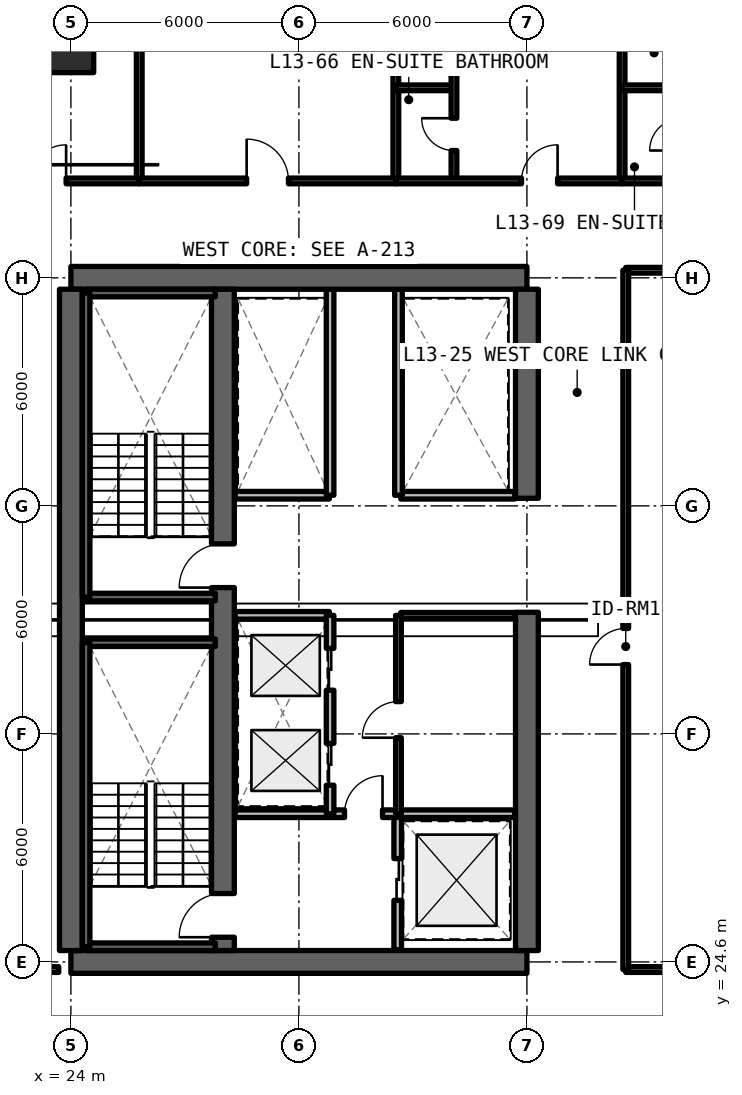
"""IFC4 building model, lengths in metres.
Left out: names, types, materials, properties, quantities, classifications, styles, units other than length and angle.
Written with IfcOpenShell. Run it as: python <this file> out.ifc"""

import sys

from ifc_helpers import new_model, si_unit, direction, frame, frame_2d, origin, origin_2d, place, context, subcontext, project, spatial, rectangle, extrude, element, fill, save


model = new_model("IFC4")
c1 = context("Model", 3, precision=1e-05, world=origin(), true_north=direction((0.0, 1.0)))
c2 = subcontext(c1, "Body", "Model", "MODEL_VIEW")
j1 = project(units=[si_unit("LENGTHUNIT", "METRE"), si_unit("PLANEANGLEUNIT", "RADIAN")], contexts=[c1])
p1 = place(None, origin())
s1 = spatial("IfcSite", under=j1, at=p1, CompositionType="ELEMENT")
p2 = place(p1, origin())
s2 = spatial("IfcBuilding", under=s1, at=p2, CompositionType="ELEMENT")
p3 = place(p2, frame((0.0, 0.0, 48.84)))
s3 = spatial("IfcBuildingStorey", under=s2, at=p3, CompositionType="ELEMENT", Elevation=48.84)
for number, where, z_axis, x_axis in (
    (1, (24.0, 24.6, 0.0), (0.0, 0.0, 1.0), (1.0, 0.0, 0.0)),
    (2, (36.0, 42.6, 0.0), (0.0, 0.0, 1.0), (-1.0, 0.0, 0.0)),
):
    element("IfcWall", number, at=place(p3, frame(where, z_axis=z_axis, x_axis=x_axis)), inside=s3, PredefinedType="SHEAR", context=c2, shape_type="SweptSolid", body=[
        extrude(rectangle(XDim=12.0, YDim=0.6, at=frame_2d((6.0, 0.0))), origin(), (0.0, 0.0, 1.0), 3.3),
    ])
p4 = place(p3, frame((24.0, 24.9, 0.0), z_axis=(0.0, 0.0, 1.0), x_axis=(0.0, 1.0, 0.0)))
e3 = element("IfcWall", 3, at=p4, inside=s3, PredefinedType="SHEAR", context=c2, shape_type="SweptSolid", body=[
    extrude(rectangle(XDim=17.4, YDim=0.6, at=frame_2d((8.7, 0.0))), origin(), (0.0, 0.0, 1.0), 3.3),
])
p5 = place(p3, frame((36.0, 24.9, 0.0), z_axis=(0.0, 0.0, 1.0), x_axis=(0.0, 1.0, 0.0)))
e4 = element("IfcWall", 4, at=p5, inside=s3, PredefinedType="SHEAR", context=c2, shape_type="SweptSolid", body=[
    extrude(rectangle(XDim=8.9, YDim=0.6, at=frame_2d((4.45, 0.0))), origin(), (0.0, 0.0, 1.0), 3.3),
])
p6 = place(p3, frame((36.0, 36.8, 0.0), z_axis=(0.0, 0.0, 1.0), x_axis=(0.0, 1.0, 0.0)))
e5 = element("IfcWall", 5, at=p6, inside=s3, PredefinedType="SHEAR", context=c2, shape_type="SweptSolid", body=[
    extrude(rectangle(XDim=5.5, YDim=0.6, at=frame_2d((2.75, 0.0))), origin(), (0.0, 0.0, 1.0), 3.3),
])
p7 = place(p3, frame((28.0, 24.9, 0.0), z_axis=(0.0, 0.0, 1.0), x_axis=(0.0, 1.0, 0.0)))
e6 = element("IfcWall", 6, at=p7, inside=s3, PredefinedType="SHEAR", context=c2, shape_type="SweptSolid", body=[
    extrude(rectangle(XDim=17.4, YDim=0.6, at=frame_2d((8.7, 0.0))), origin(), (0.0, 0.0, 1.0), 3.3),
])
p8 = place(p7, frame((0.35, 0.0, 0.0)))
e7 = element("IfcOpeningElement", 7, at=p8, cuts=e6, PredefinedType="OPENING", context=c2, shape_type="SweptSolid", body=[
    extrude(rectangle(XDim=1.15, YDim=2.15, at=frame_2d((0.575, 1.075))), frame((0.0, 0.31, 0.0), z_axis=(0.0, -1.0, 0.0), x_axis=(1.0, 0.0, 0.0)), (0.0, 0.0, 1.0), 0.62),
])
p9 = place(p7, frame((9.55, 0.0, 0.0)))
e8 = element("IfcOpeningElement", 8, at=p9, cuts=e6, PredefinedType="OPENING", context=c2, shape_type="SweptSolid", body=[
    extrude(rectangle(XDim=1.15, YDim=2.15, at=frame_2d((0.575, 1.075))), frame((0.0, 0.31, 0.0), z_axis=(0.0, -1.0, 0.0), x_axis=(1.0, 0.0, 0.0)), (0.0, 0.0, 1.0), 0.62),
])
p10 = place(p3, frame((24.0, 48.6, 0.0), z_axis=(0.0, 0.0, 1.0), x_axis=(1.0, 0.0, 0.0)))
e9 = element("IfcColumn", 9, at=p10, inside=s3, PredefinedType="COLUMN", context=c2, shape_type="SweptSolid", body=[
    extrude(rectangle(XDim=1.2, YDim=1.2, at=origin_2d()), origin(), (0.0, 0.0, 1.0), 3.3),
])
p11 = place(p3, frame((32.6, 24.92, 0.0), z_axis=(0.0, 0.0, 1.0), x_axis=(0.0, 1.0, 0.0)))
e10 = element("IfcWall", 10, at=p11, inside=s3, PredefinedType="SOLIDWALL", context=c2, shape_type="SweptSolid", body=[
    extrude(rectangle(XDim=3.58, YDim=0.2, at=frame_2d((1.79, 0.0))), origin(), (0.0, 0.0, 1.0), 2.35),
])
p12 = place(p11, frame((1.3, 0.0, 0.0)))
e11 = element("IfcOpeningElement", 11, at=p12, cuts=e10, PredefinedType="OPENING", context=c2, shape_type="SweptSolid", body=[
    extrude(rectangle(XDim=1.1, YDim=2.2, at=frame_2d((0.55, 1.1))), frame((0.0, 0.11, 0.0), z_axis=(0.0, -1.0, 0.0), x_axis=(1.0, 0.0, 0.0)), (0.0, 0.0, 1.0), 0.22),
])
p13 = place(p3, frame((28.32, 28.5, 0.0), z_axis=(0.0, 0.0, 1.0), x_axis=(1.0, 0.0, 0.0)))
e12 = element("IfcWall", 12, at=p13, inside=s3, PredefinedType="SOLIDWALL", context=c2, shape_type="SweptSolid", body=[
    extrude(rectangle(XDim=7.36, YDim=0.2, at=frame_2d((3.68, 0.0))), origin(), (0.0, 0.0, 1.0), 2.35),
])
p14 = place(p13, frame((2.88, 0.0, 0.0)))
e13 = element("IfcOpeningElement", 13, at=p14, cuts=e12, PredefinedType="OPENING", context=c2, shape_type="SweptSolid", body=[
    extrude(rectangle(XDim=1.0, YDim=2.15, at=frame_2d((0.5, 1.075))), frame((0.0, 0.11, 0.0), z_axis=(0.0, -1.0, 0.0), x_axis=(1.0, 0.0, 0.0)), (0.0, 0.0, 1.0), 0.22),
])
p15 = place(p3, frame((28.32, 33.72, 0.0), z_axis=(0.0, 0.0, 1.0), x_axis=(1.0, 0.0, 0.0)))
e14 = element("IfcWall", 14, at=p15, inside=s3, PredefinedType="SOLIDWALL", context=c2, shape_type="SweptSolid", body=[
    extrude(rectangle(XDim=2.48, YDim=0.2, at=frame_2d((1.24, 0.0))), origin(), (0.0, 0.0, 1.0), 2.35),
])
p16 = place(p3, frame((30.82, 28.5, 0.0), z_axis=(0.0, 0.0, 1.0), x_axis=(0.0, 1.0, 0.0)))
e15 = element("IfcWall", 15, at=p16, inside=s3, PredefinedType="SOLIDWALL", context=c2, shape_type="SweptSolid", body=[
    extrude(rectangle(XDim=5.22, YDim=0.2, at=frame_2d((2.61, 0.0))), origin(), (0.0, 0.0, 1.0), 2.35),
])
p17 = place(p16, frame((0.75, 0.0, 0.0)))
e16 = element("IfcOpeningElement", 16, at=p17, cuts=e15, PredefinedType="OPENING", context=c2, shape_type="SweptSolid", body=[
    extrude(rectangle(XDim=1.1, YDim=2.2, at=frame_2d((0.55, 1.1))), frame((0.0, 0.11, 0.0), z_axis=(0.0, -1.0, 0.0), x_axis=(1.0, 0.0, 0.0)), (0.0, 0.0, 1.0), 0.22),
])
p18 = place(p16, frame((3.25, 0.0, 0.0)))
e17 = element("IfcOpeningElement", 17, at=p18, cuts=e15, PredefinedType="OPENING", context=c2, shape_type="SweptSolid", body=[
    extrude(rectangle(XDim=1.1, YDim=2.2, at=frame_2d((0.55, 1.1))), frame((0.0, 0.11, 0.0), z_axis=(0.0, -1.0, 0.0), x_axis=(1.0, 0.0, 0.0)), (0.0, 0.0, 1.0), 0.22),
])
p19 = place(p3, frame((32.68, 33.72, 0.0), z_axis=(0.0, 0.0, 1.0), x_axis=(1.0, 0.0, 0.0)))
e18 = element("IfcWall", 18, at=p19, inside=s3, PredefinedType="SOLIDWALL", context=c2, shape_type="SweptSolid", body=[
    extrude(rectangle(XDim=3.0, YDim=0.15, at=frame_2d((1.5, 0.0))), origin(), (0.0, 0.0, 1.0), 2.35),
])
p20 = place(p3, frame((32.62, 28.5, 0.0), z_axis=(0.0, 0.0, 1.0), x_axis=(0.0, 1.0, 0.0)))
e19 = element("IfcWall", 19, at=p20, inside=s3, PredefinedType="SOLIDWALL", context=c2, shape_type="SweptSolid", body=[
    extrude(rectangle(XDim=5.22, YDim=0.15, at=frame_2d((2.61, 0.0))), origin(), (0.0, 0.0, 1.0), 2.35),
])
p21 = place(p20, frame((2.0, 0.0, 0.0)))
e20 = element("IfcOpeningElement", 20, at=p21, cuts=e19, PredefinedType="OPENING", context=c2, shape_type="SweptSolid", body=[
    extrude(rectangle(XDim=0.95, YDim=2.15, at=frame_2d((0.475, 1.075))), frame((0.0, 0.085, 0.0), z_axis=(0.0, -1.0, 0.0), x_axis=(1.0, 0.0, 0.0)), (0.0, 0.0, 1.0), 0.17),
])
p22 = place(p3, frame((28.32, 36.88, 0.0), z_axis=(0.0, 0.0, 1.0), x_axis=(1.0, 0.0, 0.0)))
e21 = element("IfcWall", 21, at=p22, inside=s3, PredefinedType="SOLIDWALL", context=c2, shape_type="SweptSolid", body=[
    extrude(rectangle(XDim=2.48, YDim=0.2, at=frame_2d((1.24, 0.0))), origin(), (0.0, 0.0, 1.0), 2.35),
])
p23 = place(p3, frame((30.82, 36.88, 0.0), z_axis=(0.0, 0.0, 1.0), x_axis=(0.0, 1.0, 0.0)))
e22 = element("IfcWall", 22, at=p23, inside=s3, PredefinedType="SOLIDWALL", context=c2, shape_type="SweptSolid", body=[
    extrude(rectangle(XDim=5.42, YDim=0.2, at=frame_2d((2.71, 0.0))), origin(), (0.0, 0.0, 1.0), 2.35),
])
p24 = place(p3, frame((32.68, 36.88, 0.0), z_axis=(0.0, 0.0, 1.0), x_axis=(1.0, 0.0, 0.0)))
e23 = element("IfcWall", 23, at=p24, inside=s3, PredefinedType="SOLIDWALL", context=c2, shape_type="SweptSolid", body=[
    extrude(rectangle(XDim=3.0, YDim=0.2, at=frame_2d((1.5, 0.0))), origin(), (0.0, 0.0, 1.0), 2.35),
])
p25 = place(p3, frame((32.62, 36.88, 0.0), z_axis=(0.0, 0.0, 1.0), x_axis=(0.0, 1.0, 0.0)))
e24 = element("IfcWall", 24, at=p25, inside=s3, PredefinedType="SOLIDWALL", context=c2, shape_type="SweptSolid", body=[
    extrude(rectangle(XDim=5.42, YDim=0.2, at=frame_2d((2.71, 0.0))), origin(), (0.0, 0.0, 1.0), 2.35),
])
for number, where, z_axis, x_axis in (
    (25, (38.6, 24.4, 0.0), (0.0, 0.0, 1.0), (1.0, 0.0, 0.0)),
    (26, (38.6, 42.8, 0.0), (0.0, 0.0, 1.0), (1.0, 0.0, 0.0)),
):
    element("IfcWall", number, at=place(p3, frame(where, z_axis=z_axis, x_axis=x_axis)), inside=s3, PredefinedType="SOLIDWALL", context=c2, shape_type="SweptSolid", body=[
        extrude(rectangle(XDim=8.25, YDim=0.15, at=frame_2d((4.125, 0.0))), origin(), (0.0, 0.0, 1.0), 2.295),
    ])
p26 = place(p3, frame((38.6, 24.4, 0.0), z_axis=(0.0, 0.0, 1.0), x_axis=(0.0, 1.0, 0.0)))
e27 = element("IfcWall", 27, at=p26, inside=s3, PredefinedType="SOLIDWALL", context=c2, shape_type="SweptSolid", body=[
    extrude(rectangle(XDim=18.4, YDim=0.15, at=frame_2d((9.2, 0.0))), origin(), (0.0, 0.0, 1.0), 2.35),
])
p27 = place(p26, frame((8.025, 0.0, 0.0)))
e28 = element("IfcOpeningElement", 28, at=p27, cuts=e27, PredefinedType="OPENING", context=c2, shape_type="SweptSolid", body=[
    extrude(rectangle(XDim=0.95, YDim=2.15, at=frame_2d((0.475, 1.075))), frame((0.0, 0.085, 0.0), z_axis=(0.0, -1.0, 0.0), x_axis=(1.0, 0.0, 0.0)), (0.0, 0.0, 1.0), 0.17),
])
p28 = place(p3, frame((16.84, 24.4, 0.0), z_axis=(0.0, 0.0, 1.0), x_axis=(1.0, 0.0, 0.0)))
e29 = element("IfcWall", 29, at=p28, inside=s3, PredefinedType="SOLIDWALL", context=c2, shape_type="SweptSolid", body=[
    extrude(rectangle(XDim=6.84, YDim=0.15, at=frame_2d((3.42, 0.0))), origin(), (0.0, 0.0, 1.0), 2.295),
])
p29 = place(p28, frame((2.945, 0.0, 0.0)))
e30 = element("IfcOpeningElement", 30, at=p29, cuts=e29, PredefinedType="OPENING", context=c2, shape_type="SweptSolid", body=[
    extrude(rectangle(XDim=0.95, YDim=2.15, at=frame_2d((0.475, 1.075))), frame((0.0, 0.085, 0.0), z_axis=(0.0, -1.0, 0.0), x_axis=(1.0, 0.0, 0.0)), (0.0, 0.0, 1.0), 0.17),
])
p30 = place(p3, frame((25.798, 45.15, 0.0), z_axis=(0.0, 0.0, 1.0), x_axis=(0.0, 1.0, 0.0)))
e31 = element("IfcWall", 31, at=p30, inside=s3, PredefinedType="SOLIDWALL", context=c2, shape_type="SweptSolid", body=[
    extrude(rectangle(XDim=14.17, YDim=0.15, at=frame_2d((7.085, 0.0))), origin(), (0.0, 0.0, 1.0), 2.35),
])
p31 = place(p3, frame((21.0, 45.15, 0.0), z_axis=(0.0, 0.0, 1.0), x_axis=(1.0, 0.0, 0.0)))
e32 = element("IfcWall", 32, at=p31, inside=s3, PredefinedType="SOLIDWALL", context=c2, shape_type="SweptSolid", body=[
    extrude(rectangle(XDim=4.798, YDim=0.15, at=frame_2d((2.399, 0.0))), origin(), (0.0, 0.0, 1.0), 2.35),
])
p32 = place(p31, frame((1.924, 0.0, 0.0)))
e33 = element("IfcOpeningElement", 33, at=p32, cuts=e32, PredefinedType="OPENING", context=c2, shape_type="SweptSolid", body=[
    extrude(rectangle(XDim=0.95, YDim=2.15, at=frame_2d((0.475, 1.075))), frame((0.0, 0.085, 0.0), z_axis=(0.0, -1.0, 0.0), x_axis=(1.0, 0.0, 0.0)), (0.0, 0.0, 1.0), 0.17),
])
p33 = place(p3, frame((32.551, 45.15, 0.0), z_axis=(0.0, 0.0, 1.0), x_axis=(0.0, 1.0, 0.0)))
e34 = element("IfcWall", 34, at=p33, inside=s3, PredefinedType="SOLIDWALL", context=c2, shape_type="SweptSolid", body=[
    extrude(rectangle(XDim=14.17, YDim=0.15, at=frame_2d((7.085, 0.0))), origin(), (0.0, 0.0, 1.0), 2.35),
])
p34 = place(p3, frame((25.798, 45.15, 0.0), z_axis=(0.0, 0.0, 1.0), x_axis=(1.0, 0.0, 0.0)))
e35 = element("IfcWall", 35, at=p34, inside=s3, PredefinedType="SOLIDWALL", context=c2, shape_type="SweptSolid", body=[
    extrude(rectangle(XDim=6.753, YDim=0.15, at=frame_2d((3.376, 0.0))), origin(), (0.0, 0.0, 1.0), 2.35),
])
p35 = place(p34, frame((2.826, 0.0, 0.0)))
e36 = element("IfcOpeningElement", 36, at=p35, cuts=e35, PredefinedType="OPENING", context=c2, shape_type="SweptSolid", body=[
    extrude(rectangle(XDim=1.1, YDim=2.15, at=frame_2d((0.55, 1.075))), frame((0.0, 0.085, 0.0), z_axis=(0.0, -1.0, 0.0), x_axis=(1.0, 0.0, 0.0)), (0.0, 0.0, 1.0), 0.17),
])
p36 = place(p3, frame((38.504, 45.15, 0.0), z_axis=(0.0, 0.0, 1.0), x_axis=(0.0, 1.0, 0.0)))
e37 = element("IfcWall", 37, at=p36, inside=s3, PredefinedType="SOLIDWALL", context=c2, shape_type="SweptSolid", body=[
    extrude(rectangle(XDim=14.17, YDim=0.15, at=frame_2d((7.085, 0.0))), origin(), (0.0, 0.0, 1.0), 2.35),
])
p37 = place(p3, frame((32.551, 47.6, 0.0), z_axis=(0.0, 0.0, 1.0), x_axis=(1.0, 0.0, 0.0)))
e38 = element("IfcWall", 38, at=p37, inside=s3, PredefinedType="PARTITIONING", context=c2, shape_type="SweptSolid", body=[
    extrude(rectangle(XDim=1.529, YDim=0.15, at=frame_2d((0.765, 0.0))), origin(), (0.0, 0.0, 1.0), 2.35),
])
p38 = place(p3, frame((34.08, 45.15, 0.0), z_axis=(0.0, 0.0, 1.0), x_axis=(0.0, 1.0, 0.0)))
e39 = element("IfcWall", 39, at=p38, inside=s3, PredefinedType="PARTITIONING", context=c2, shape_type="SweptSolid", body=[
    extrude(rectangle(XDim=14.17, YDim=0.15, at=frame_2d((7.085, 0.0))), origin(), (0.0, 0.0, 1.0), 2.35),
])
p39 = place(p38, frame((0.8, 0.0, 0.0)))
e40 = element("IfcOpeningElement", 40, at=p39, cuts=e39, PredefinedType="OPENING", context=c2, shape_type="SweptSolid", body=[
    extrude(rectangle(XDim=0.85, YDim=2.1, at=frame_2d((0.425, 1.05))), frame((0.0, 0.085, 0.0), z_axis=(0.0, -1.0, 0.0), x_axis=(1.0, 0.0, 0.0)), (0.0, 0.0, 1.0), 0.17),
])
p40 = place(p38, frame((6.798, 0.0, 0.0)))
e41 = element("IfcOpeningElement", 41, at=p40, cuts=e39, PredefinedType="OPENING", context=c2, shape_type="SweptSolid", body=[
    extrude(rectangle(XDim=0.85, YDim=2.1, at=frame_2d((0.425, 1.05))), frame((0.0, 0.085, 0.0), z_axis=(0.0, -1.0, 0.0), x_axis=(1.0, 0.0, 0.0)), (0.0, 0.0, 1.0), 0.17),
])
p41 = place(p3, frame((32.551, 45.15, 0.0), z_axis=(0.0, 0.0, 1.0), x_axis=(1.0, 0.0, 0.0)))
e42 = element("IfcWall", 42, at=p41, inside=s3, PredefinedType="SOLIDWALL", context=c2, shape_type="SweptSolid", body=[
    extrude(rectangle(XDim=5.953, YDim=0.15, at=frame_2d((2.977, 0.0))), origin(), (0.0, 0.0, 1.0), 2.35),
])
p42 = place(p41, frame((3.306, 0.0, 0.0)))
e43 = element("IfcOpeningElement", 43, at=p42, cuts=e42, PredefinedType="OPENING", context=c2, shape_type="SweptSolid", body=[
    extrude(rectangle(XDim=0.95, YDim=2.15, at=frame_2d((0.475, 1.075))), frame((0.0, 0.085, 0.0), z_axis=(0.0, -1.0, 0.0), x_axis=(1.0, 0.0, 0.0)), (0.0, 0.0, 1.0), 0.17),
])
p43 = place(p3, frame((38.504, 47.6, 0.0), z_axis=(0.0, 0.0, 1.0), x_axis=(1.0, 0.0, 0.0)))
e44 = element("IfcWall", 44, at=p43, inside=s3, PredefinedType="PARTITIONING", context=c2, shape_type="SweptSolid", body=[
    extrude(rectangle(XDim=1.576, YDim=0.15, at=frame_2d((0.788, 0.0))), origin(), (0.0, 0.0, 1.0), 2.35),
])
p44 = place(p3, frame((38.504, 45.15, 0.0), z_axis=(0.0, 0.0, 1.0), x_axis=(1.0, 0.0, 0.0)))
e45 = element("IfcWall", 45, at=p44, inside=s3, PredefinedType="SOLIDWALL", context=c2, shape_type="SweptSolid", body=[
    extrude(rectangle(XDim=4.976, YDim=0.15, at=frame_2d((2.488, 0.0))), origin(), (0.0, 0.0, 1.0), 2.35),
])
p45 = place(p44, frame((2.841, 0.0, 0.0)))
e46 = element("IfcOpeningElement", 46, at=p45, cuts=e45, PredefinedType="OPENING", context=c2, shape_type="SweptSolid", body=[
    extrude(rectangle(XDim=0.95, YDim=2.15, at=frame_2d((0.475, 1.075))), frame((0.0, 0.085, 0.0), z_axis=(0.0, -1.0, 0.0), x_axis=(1.0, 0.0, 0.0)), (0.0, 0.0, 1.0), 0.17),
])
for number, where, z_axis, x_axis in (
    (47, (24.4, 25.0, 0.0), (0.0, 0.0, 1.0), (1.0, 0.0, 0.0)),
    (48, (27.8, 33.0, 0.0), (0.0, 0.0, 1.0), (-1.0, 0.0, 0.0)),
):
    element("IfcWall", number, at=place(p3, frame(where, z_axis=z_axis, x_axis=x_axis)), inside=s3, PredefinedType="SOLIDWALL", context=c2, shape_type="SweptSolid", body=[
        extrude(rectangle(XDim=3.4, YDim=0.2, at=frame_2d((1.7, 0.0))), origin(), (0.0, 0.0, 1.0), 3.3),
    ])
p46 = place(p3, frame((24.4, 33.0, 0.0), z_axis=(0.0, 0.0, 1.0), x_axis=(0.0, -1.0, 0.0)))
e49 = element("IfcWall", 49, at=p46, inside=s3, PredefinedType="SOLIDWALL", context=c2, shape_type="SweptSolid", body=[
    extrude(rectangle(XDim=8.0, YDim=0.2, at=frame_2d((4.0, 0.0))), origin(), (0.0, 0.0, 1.0), 3.3),
])
for number, where, z_axis, x_axis in (
    (50, (24.4, 34.2, 0.0), (0.0, 0.0, 1.0), (1.0, 0.0, 0.0)),
    (51, (27.8, 42.2, 0.0), (0.0, 0.0, 1.0), (-1.0, 0.0, 0.0)),
):
    element("IfcWall", number, at=place(p3, frame(where, z_axis=z_axis, x_axis=x_axis)), inside=s3, PredefinedType="SOLIDWALL", context=c2, shape_type="SweptSolid", body=[
        extrude(rectangle(XDim=3.4, YDim=0.2, at=frame_2d((1.7, 0.0))), origin(), (0.0, 0.0, 1.0), 3.3),
    ])
p47 = place(p3, frame((24.4, 42.2, 0.0), z_axis=(0.0, 0.0, 1.0), x_axis=(0.0, -1.0, 0.0)))
e52 = element("IfcWall", 52, at=p47, inside=s3, PredefinedType="SOLIDWALL", context=c2, shape_type="SweptSolid", body=[
    extrude(rectangle(XDim=8.0, YDim=0.2, at=frame_2d((4.0, 0.0))), origin(), (0.0, 0.0, 1.0), 3.3),
])
p48 = place(p12, origin())
e53 = element("IfcDoor", 53, at=p48, inside=s3, OperationType="SLIDING_TO_LEFT", PredefinedType="DOOR", context=c2, shape_type="SweptSolid", body=[
    extrude(rectangle(XDim=1.1, YDim=2.2, at=frame_2d((0.55, 1.1))), frame((0.0, 0.025, 0.0), z_axis=(0.0, -1.0, 0.0), x_axis=(1.0, 0.0, 0.0)), (0.0, 0.0, 1.0), 0.05),
])
fill(e11, e53)
p49 = place(p14, origin())
e54 = element("IfcDoor", 54, at=p49, inside=s3, OperationType="SINGLE_SWING_RIGHT", PredefinedType="DOOR", context=c2, shape_type="SweptSolid", body=[
    extrude(rectangle(XDim=1.0, YDim=2.15, at=frame_2d((0.5, 1.075))), frame((0.0, 0.025, 0.0), z_axis=(0.0, -1.0, 0.0), x_axis=(1.0, 0.0, 0.0)), (0.0, 0.0, 1.0), 0.05),
])
fill(e13, e54)
p50 = place(p17, origin())
e55 = element("IfcDoor", 55, at=p50, inside=s3, OperationType="SLIDING_TO_LEFT", PredefinedType="DOOR", context=c2, shape_type="SweptSolid", body=[
    extrude(rectangle(XDim=1.1, YDim=2.2, at=frame_2d((0.55, 1.1))), frame((0.0, 0.025, 0.0), z_axis=(0.0, -1.0, 0.0), x_axis=(1.0, 0.0, 0.0)), (0.0, 0.0, 1.0), 0.05),
])
fill(e16, e55)
p51 = place(p18, origin())
e56 = element("IfcDoor", 56, at=p51, inside=s3, OperationType="SLIDING_TO_RIGHT", PredefinedType="DOOR", context=c2, shape_type="SweptSolid", body=[
    extrude(rectangle(XDim=1.1, YDim=2.2, at=frame_2d((0.55, 1.1))), frame((0.0, 0.025, 0.0), z_axis=(0.0, -1.0, 0.0), x_axis=(1.0, 0.0, 0.0)), (0.0, 0.0, 1.0), 0.05),
])
fill(e17, e56)
p52 = place(p21, origin())
e57 = element("IfcDoor", 57, at=p52, inside=s3, OperationType="SINGLE_SWING_LEFT", PredefinedType="DOOR", context=c2, shape_type="SweptSolid", body=[
    extrude(rectangle(XDim=0.95, YDim=2.15, at=frame_2d((0.475, 1.075))), frame((0.0, 0.025, 0.0), z_axis=(0.0, -1.0, 0.0), x_axis=(1.0, 0.0, 0.0)), (0.0, 0.0, 1.0), 0.05),
])
fill(e20, e57)
p53 = place(p27, origin())
e58 = element("IfcDoor", 58, at=p53, inside=s3, OperationType="SINGLE_SWING_LEFT", PredefinedType="DOOR", context=c2, shape_type="SweptSolid", body=[
    extrude(rectangle(XDim=0.95, YDim=2.15, at=frame_2d((0.475, 1.075))), frame((0.0, 0.025, 0.0), z_axis=(0.0, -1.0, 0.0), x_axis=(1.0, 0.0, 0.0)), (0.0, 0.0, 1.0), 0.05),
])
fill(e28, e58)
p54 = place(p32, origin())
e59 = element("IfcDoor", 59, at=p54, inside=s3, OperationType="SINGLE_SWING_RIGHT", PredefinedType="DOOR", context=c2, shape_type="SweptSolid", body=[
    extrude(rectangle(XDim=0.95, YDim=2.15, at=frame_2d((0.475, 1.075))), frame((0.0, 0.025, 0.0), z_axis=(0.0, -1.0, 0.0), x_axis=(1.0, 0.0, 0.0)), (0.0, 0.0, 1.0), 0.05),
])
fill(e33, e59)
p55 = place(p35, origin())
e60 = element("IfcDoor", 60, at=p55, inside=s3, OperationType="SINGLE_SWING_LEFT", PredefinedType="DOOR", context=c2, shape_type="SweptSolid", body=[
    extrude(rectangle(XDim=1.1, YDim=2.15, at=frame_2d((0.55, 1.075))), frame((0.0, 0.025, 0.0), z_axis=(0.0, -1.0, 0.0), x_axis=(1.0, 0.0, 0.0)), (0.0, 0.0, 1.0), 0.05),
])
fill(e36, e60)
p56 = place(p39, origin())
e61 = element("IfcDoor", 61, at=p56, inside=s3, OperationType="SINGLE_SWING_RIGHT", PredefinedType="DOOR", context=c2, shape_type="SweptSolid", body=[
    extrude(rectangle(XDim=0.85, YDim=2.1, at=frame_2d((0.425, 1.05))), frame((0.0, 0.025, 0.0), z_axis=(0.0, -1.0, 0.0), x_axis=(1.0, 0.0, 0.0)), (0.0, 0.0, 1.0), 0.05),
])
fill(e40, e61)
p57 = place(p42, origin())
e62 = element("IfcDoor", 62, at=p57, inside=s3, OperationType="SINGLE_SWING_RIGHT", PredefinedType="DOOR", context=c2, shape_type="SweptSolid", body=[
    extrude(rectangle(XDim=0.95, YDim=2.15, at=frame_2d((0.475, 1.075))), frame((0.0, 0.025, 0.0), z_axis=(0.0, -1.0, 0.0), x_axis=(1.0, 0.0, 0.0)), (0.0, 0.0, 1.0), 0.05),
])
fill(e43, e62)
p58 = place(p8, origin())
e63 = element("IfcDoor", 63, at=p58, inside=s3, OperationType="SINGLE_SWING_RIGHT", PredefinedType="DOOR", context=c2, shape_type="SweptSolid", body=[
    extrude(rectangle(XDim=1.15, YDim=2.15, at=frame_2d((0.575, 1.075))), frame((0.0, 0.025, 0.0), z_axis=(0.0, -1.0, 0.0), x_axis=(1.0, 0.0, 0.0)), (0.0, 0.0, 1.0), 0.05),
])
fill(e7, e63)
p59 = place(p9, origin())
e64 = element("IfcDoor", 64, at=p59, inside=s3, OperationType="SINGLE_SWING_LEFT", PredefinedType="DOOR", context=c2, shape_type="SweptSolid", body=[
    extrude(rectangle(XDim=1.15, YDim=2.15, at=frame_2d((0.575, 1.075))), frame((0.0, 0.025, 0.0), z_axis=(0.0, -1.0, 0.0), x_axis=(1.0, 0.0, 0.0)), (0.0, 0.0, 1.0), 0.05),
])
fill(e8, e64)
save(model, sys.argv[1])
